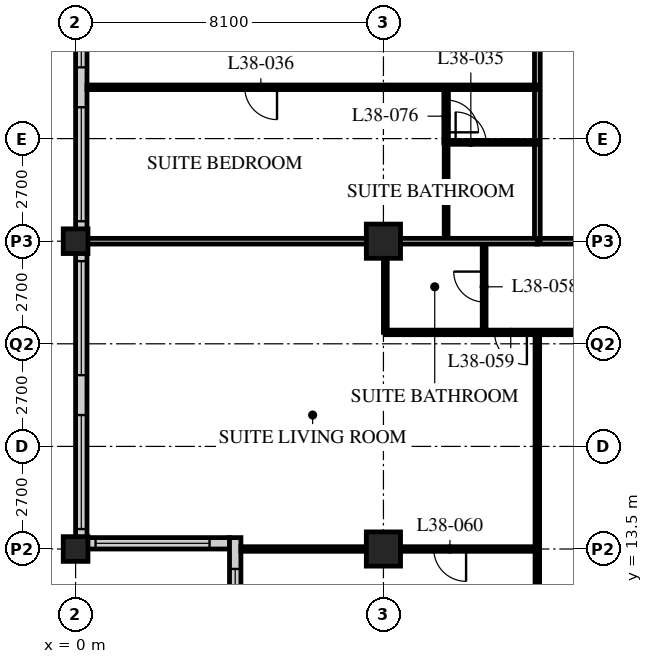
"""IFC4 building model, lengths in metres.
Left out: names, types, materials, properties, quantities, classifications, styles, units other than length and angle.
Written with IfcOpenShell. Run it as: python <this file> out.ifc"""

import sys

from ifc_helpers import new_model, si_unit, direction, frame, frame_2d, origin, origin_2d, place, context, subcontext, project, spatial, rectangle, hollow_rectangle, extrude, element, fill, save


model = new_model("IFC4")
c1 = context("Model", 3, precision=1e-05, world=origin(), true_north=direction((0.0, 1.0)))
c2 = subcontext(c1, "Body", "Model", "MODEL_VIEW")
j1 = project(units=[si_unit("LENGTHUNIT", "METRE"), si_unit("PLANEANGLEUNIT", "RADIAN")], contexts=[c1])
p1 = place(None, origin())
s1 = spatial("IfcSite", under=j1, at=p1, CompositionType="ELEMENT")
p2 = place(p1, origin())
s2 = spatial("IfcBuilding", under=s1, at=p2, CompositionType="ELEMENT")
p3 = place(p2, frame((0.0, 0.0, 147.6)))
s3 = spatial("IfcBuildingStorey", under=s2, at=p3, CompositionType="ELEMENT", Elevation=147.6)
for number, where, z_axis, x_axis in (
    (1, (0.0, 13.5, 0.0), (0.0, 0.0, 1.0), (1.0, 0.0, 0.0)),
    (2, (0.0, 21.6, 0.0), (0.0, 0.0, 1.0), (1.0, 0.0, 0.0)),
):
    element("IfcColumn", number, at=place(p3, frame(where, z_axis=z_axis, x_axis=x_axis)), inside=s3, PredefinedType="COLUMN", context=c2, shape_type="SweptSolid", body=[
        extrude(hollow_rectangle(XDim=0.65, YDim=0.65, WallThickness=0.055, at=origin_2d()), origin(), (0.0, 0.0, 1.0), 3.4),
    ])
for number, where, z_axis, x_axis in (
    (3, (8.1, 13.5, 0.0), (0.0, 0.0, 1.0), (1.0, 0.0, 0.0)),
    (4, (8.1, 21.6, 0.0), (0.0, 0.0, 1.0), (1.0, 0.0, 0.0)),
):
    element("IfcColumn", number, at=place(p3, frame(where, z_axis=z_axis, x_axis=x_axis)), inside=s3, PredefinedType="COLUMN", context=c2, shape_type="SweptSolid", body=[
        extrude(hollow_rectangle(XDim=0.9, YDim=0.9, WallThickness=0.1, at=origin_2d()), origin(), (0.0, 0.0, 1.0), 3.4),
    ])
p4 = place(p3, frame((0.15, 45.6, 0.0), z_axis=(0.0, 0.0, 1.0), x_axis=(0.0, -1.0, 0.0)))
e5 = element("IfcWall", 5, at=p4, inside=s3, PredefinedType="SOLIDWALL", context=c2, shape_type="SweptSolid", body=[
    extrude(rectangle(XDim=32.1, YDim=0.3, at=frame_2d((16.05, 0.0))), origin(), (0.0, 0.0, 1.0), 3.19),
])
p5 = place(p4, frame((0.225, 0.0, 0.9)))
e6 = element("IfcOpeningElement", 6, at=p5, cuts=e5, PredefinedType="OPENING", context=c2, shape_type="SweptSolid", body=[
    extrude(rectangle(XDim=3.0, YDim=1.4, at=frame_2d((1.5, 0.7))), frame((0.0, 0.16, 0.0), z_axis=(0.0, -1.0, 0.0), x_axis=(1.0, 0.0, 0.0)), (0.0, 0.0, 1.0), 0.32),
])
p6 = place(p4, frame((4.275, 0.0, 0.9)))
e7 = element("IfcOpeningElement", 7, at=p6, cuts=e5, PredefinedType="OPENING", context=c2, shape_type="SweptSolid", body=[
    extrude(rectangle(XDim=3.0, YDim=1.4, at=frame_2d((1.5, 0.7))), frame((0.0, 0.16, 0.0), z_axis=(0.0, -1.0, 0.0), x_axis=(1.0, 0.0, 0.0)), (0.0, 0.0, 1.0), 0.32),
])
p7 = place(p4, frame((8.325, 0.0, 0.9)))
e8 = element("IfcOpeningElement", 8, at=p7, cuts=e5, PredefinedType="OPENING", context=c2, shape_type="SweptSolid", body=[
    extrude(rectangle(XDim=3.0, YDim=1.4, at=frame_2d((1.5, 0.7))), frame((0.0, 0.16, 0.0), z_axis=(0.0, -1.0, 0.0), x_axis=(1.0, 0.0, 0.0)), (0.0, 0.0, 1.0), 0.32),
])
p8 = place(p4, frame((12.375, 0.0, 0.9)))
e9 = element("IfcOpeningElement", 9, at=p8, cuts=e5, PredefinedType="OPENING", context=c2, shape_type="SweptSolid", body=[
    extrude(rectangle(XDim=3.0, YDim=1.4, at=frame_2d((1.5, 0.7))), frame((0.0, 0.16, 0.0), z_axis=(0.0, -1.0, 0.0), x_axis=(1.0, 0.0, 0.0)), (0.0, 0.0, 1.0), 0.32),
])
p9 = place(p4, frame((16.425, 0.0, 0.9)))
e10 = element("IfcOpeningElement", 10, at=p9, cuts=e5, PredefinedType="OPENING", context=c2, shape_type="SweptSolid", body=[
    extrude(rectangle(XDim=3.0, YDim=1.4, at=frame_2d((1.5, 0.7))), frame((0.0, 0.16, 0.0), z_axis=(0.0, -1.0, 0.0), x_axis=(1.0, 0.0, 0.0)), (0.0, 0.0, 1.0), 0.32),
])
p10 = place(p4, frame((20.475, 0.0, 0.9)))
e11 = element("IfcOpeningElement", 11, at=p10, cuts=e5, PredefinedType="OPENING", context=c2, shape_type="SweptSolid", body=[
    extrude(rectangle(XDim=3.0, YDim=1.4, at=frame_2d((1.5, 0.7))), frame((0.0, 0.16, 0.0), z_axis=(0.0, -1.0, 0.0), x_axis=(1.0, 0.0, 0.0)), (0.0, 0.0, 1.0), 0.32),
])
p11 = place(p4, frame((24.525, 0.0, 0.9)))
e12 = element("IfcOpeningElement", 12, at=p11, cuts=e5, PredefinedType="OPENING", context=c2, shape_type="SweptSolid", body=[
    extrude(rectangle(XDim=3.0, YDim=1.4, at=frame_2d((1.5, 0.7))), frame((0.0, 0.16, 0.0), z_axis=(0.0, -1.0, 0.0), x_axis=(1.0, 0.0, 0.0)), (0.0, 0.0, 1.0), 0.32),
])
p12 = place(p4, frame((28.575, 0.0, 0.9)))
e13 = element("IfcOpeningElement", 13, at=p12, cuts=e5, PredefinedType="OPENING", context=c2, shape_type="SweptSolid", body=[
    extrude(rectangle(XDim=3.0, YDim=1.4, at=frame_2d((1.5, 0.7))), frame((0.0, 0.16, 0.0), z_axis=(0.0, -1.0, 0.0), x_axis=(1.0, 0.0, 0.0)), (0.0, 0.0, 1.0), 0.32),
])
p13 = place(p3, frame((0.3, 13.65, 0.0), z_axis=(0.0, 0.0, 1.0), x_axis=(1.0, 0.0, 0.0)))
e14 = element("IfcWall", 14, at=p13, inside=s3, PredefinedType="SOLIDWALL", context=c2, shape_type="SweptSolid", body=[
    extrude(rectangle(XDim=3.75, YDim=0.3, at=frame_2d((1.875, 0.0))), origin(), (0.0, 0.0, 1.0), 3.19),
])
p14 = place(p13, frame((0.225, 0.0, 0.9)))
e15 = element("IfcOpeningElement", 15, at=p14, cuts=e14, PredefinedType="OPENING", context=c2, shape_type="SweptSolid", body=[
    extrude(rectangle(XDim=3.0, YDim=1.4, at=frame_2d((1.5, 0.7))), frame((0.0, 0.16, 0.0), z_axis=(0.0, -1.0, 0.0), x_axis=(1.0, 0.0, 0.0)), (0.0, 0.0, 1.0), 0.32),
])
p15 = place(p3, frame((4.2, 13.8, 0.0), z_axis=(0.0, 0.0, 1.0), x_axis=(0.0, -1.0, 0.0)))
e16 = element("IfcWall", 16, at=p15, inside=s3, PredefinedType="SOLIDWALL", context=c2, shape_type="SweptSolid", body=[
    extrude(rectangle(XDim=4.35, YDim=0.3, at=frame_2d((2.175, 0.0))), origin(), (0.0, 0.0, 1.0), 3.19),
])
p16 = place(p15, frame((0.825, 0.0, 0.9)))
e17 = element("IfcOpeningElement", 17, at=p16, cuts=e16, PredefinedType="OPENING", context=c2, shape_type="SweptSolid", body=[
    extrude(rectangle(XDim=3.0, YDim=1.4, at=frame_2d((1.5, 0.7))), frame((0.0, 0.16, 0.0), z_axis=(0.0, -1.0, 0.0), x_axis=(1.0, 0.0, 0.0)), (0.0, 0.0, 1.0), 0.32),
])
p17 = place(p3, frame((12.15, 21.6, 0.0), z_axis=(0.0, 0.0, 1.0), x_axis=(1.0, 0.0, 0.0)))
e18 = element("IfcWall", 18, at=p17, inside=s3, PredefinedType="PARTITIONING", context=c2, shape_type="SweptSolid", body=[
    extrude(rectangle(XDim=36.45, YDim=0.15, at=frame_2d((18.225, 0.0))), origin(), (0.0, 0.0, 1.0), 2.42),
])
p18 = place(p17, frame((5.95, 0.0, 0.0)))
e19 = element("IfcOpeningElement", 19, at=p18, cuts=e18, PredefinedType="OPENING", context=c2, shape_type="SweptSolid", body=[
    extrude(rectangle(XDim=1.0, YDim=2.1, at=frame_2d((0.5, 1.05))), frame((0.0, 0.085, 0.0), z_axis=(0.0, -1.0, 0.0), x_axis=(1.0, 0.0, 0.0)), (0.0, 0.0, 1.0), 0.17),
])
p19 = place(p17, frame((14.05, 0.0, 0.0)))
e20 = element("IfcOpeningElement", 20, at=p19, cuts=e18, PredefinedType="OPENING", context=c2, shape_type="SweptSolid", body=[
    extrude(rectangle(XDim=1.0, YDim=2.1, at=frame_2d((0.5, 1.05))), frame((0.0, 0.085, 0.0), z_axis=(0.0, -1.0, 0.0), x_axis=(1.0, 0.0, 0.0)), (0.0, 0.0, 1.0), 0.17),
])
p20 = place(p17, frame((22.15, 0.0, 0.0)))
e21 = element("IfcOpeningElement", 21, at=p20, cuts=e18, PredefinedType="OPENING", context=c2, shape_type="SweptSolid", body=[
    extrude(rectangle(XDim=1.0, YDim=2.1, at=frame_2d((0.5, 1.05))), frame((0.0, 0.085, 0.0), z_axis=(0.0, -1.0, 0.0), x_axis=(1.0, 0.0, 0.0)), (0.0, 0.0, 1.0), 0.17),
])
p21 = place(p17, frame((30.8, 0.0, 0.0)))
e22 = element("IfcOpeningElement", 22, at=p21, cuts=e18, PredefinedType="OPENING", context=c2, shape_type="SweptSolid", body=[
    extrude(rectangle(XDim=1.0, YDim=2.1, at=frame_2d((0.5, 1.05))), frame((0.0, 0.085, 0.0), z_axis=(0.0, -1.0, 0.0), x_axis=(1.0, 0.0, 0.0)), (0.0, 0.0, 1.0), 0.17),
])
p22 = place(p17, frame((1.525, 0.0, 0.0)))
e23 = element("IfcOpeningElement", 23, at=p22, cuts=e18, PredefinedType="OPENING", context=c2, shape_type="SweptSolid", body=[
    extrude(rectangle(XDim=1.0, YDim=2.1, at=frame_2d((0.5, 1.05))), frame((0.0, 0.085, 0.0), z_axis=(0.0, -1.0, 0.0), x_axis=(1.0, 0.0, 0.0)), (0.0, 0.0, 1.0), 0.17),
])
p23 = place(p17, frame((33.925, 0.0, 0.0)))
e24 = element("IfcOpeningElement", 24, at=p23, cuts=e18, PredefinedType="OPENING", context=c2, shape_type="SweptSolid", body=[
    extrude(rectangle(XDim=1.0, YDim=2.1, at=frame_2d((0.5, 1.05))), frame((0.0, 0.085, 0.0), z_axis=(0.0, -1.0, 0.0), x_axis=(1.0, 0.0, 0.0)), (0.0, 0.0, 1.0), 0.17),
])
p24 = place(p3, frame((12.15, 21.6, 0.0), z_axis=(0.0, 0.0, 1.0), x_axis=(0.0, 1.0, 0.0)))
e25 = element("IfcWall", 25, at=p24, inside=s3, PredefinedType="PARTITIONING", context=c2, shape_type="SweptSolid", body=[
    extrude(rectangle(XDim=24.3, YDim=0.15, at=frame_2d((12.15, 0.0))), origin(), (0.0, 0.0, 1.0), 3.19),
])
p25 = place(p24, frame((5.575, 0.0, 0.0)))
e26 = element("IfcOpeningElement", 26, at=p25, cuts=e25, PredefinedType="OPENING", context=c2, shape_type="SweptSolid", body=[
    extrude(rectangle(XDim=1.0, YDim=2.1, at=frame_2d((0.5, 1.05))), frame((0.0, 0.085, 0.0), z_axis=(0.0, -1.0, 0.0), x_axis=(1.0, 0.0, 0.0)), (0.0, 0.0, 1.0), 0.17),
])
p26 = place(p24, frame((14.05, 0.0, 0.0)))
e27 = element("IfcOpeningElement", 27, at=p26, cuts=e25, PredefinedType="OPENING", context=c2, shape_type="SweptSolid", body=[
    extrude(rectangle(XDim=1.0, YDim=2.1, at=frame_2d((0.5, 1.05))), frame((0.0, 0.085, 0.0), z_axis=(0.0, -1.0, 0.0), x_axis=(1.0, 0.0, 0.0)), (0.0, 0.0, 1.0), 0.17),
])
p27 = place(p24, frame((22.7, 0.0, 0.0)))
e28 = element("IfcOpeningElement", 28, at=p27, cuts=e25, PredefinedType="OPENING", context=c2, shape_type="SweptSolid", body=[
    extrude(rectangle(XDim=1.0, YDim=2.1, at=frame_2d((0.5, 1.05))), frame((0.0, 0.085, 0.0), z_axis=(0.0, -1.0, 0.0), x_axis=(1.0, 0.0, 0.0)), (0.0, 0.0, 1.0), 0.17),
])
p28 = place(p3, frame((9.75, 21.6, 0.0), z_axis=(0.0, 0.0, 1.0), x_axis=(0.0, 1.0, 0.0)))
e29 = element("IfcWall", 29, at=p28, inside=s3, PredefinedType="PARTITIONING", context=c2, shape_type="SweptSolid", body=[
    extrude(rectangle(XDim=2.6, YDim=0.1, at=frame_2d((1.3, 0.0))), origin(), (0.0, 0.0, 1.0), 3.19),
])
p29 = place(p3, frame((12.15, 24.2, 0.0), z_axis=(0.0, 0.0, 1.0), x_axis=(-1.0, 0.0, 0.0)))
e30 = element("IfcWall", 30, at=p29, inside=s3, PredefinedType="PARTITIONING", context=c2, shape_type="SweptSolid", body=[
    extrude(rectangle(XDim=2.4, YDim=0.1, at=frame_2d((1.2, 0.0))), origin(), (0.0, 0.0, 1.0), 3.19),
])
p30 = place(p29, frame((1.35, 0.0, 0.0)))
e31 = element("IfcOpeningElement", 31, at=p30, cuts=e30, PredefinedType="OPENING", context=c2, shape_type="SweptSolid", body=[
    extrude(rectangle(XDim=0.8, YDim=2.1, at=frame_2d((0.4, 1.05))), frame((0.0, 0.06, 0.0), z_axis=(0.0, -1.0, 0.0), x_axis=(1.0, 0.0, 0.0)), (0.0, 0.0, 1.0), 0.12),
])
p31 = place(p3, frame((12.15, 25.65, 0.0), z_axis=(0.0, 0.0, 1.0), x_axis=(-1.0, 0.0, 0.0)))
e32 = element("IfcWall", 32, at=p31, inside=s3, PredefinedType="PARTITIONING", context=c2, shape_type="SweptSolid", body=[
    extrude(rectangle(XDim=11.85, YDim=0.12, at=frame_2d((5.925, 0.0))), origin(), (0.0, 0.0, 1.0), 3.19),
])
p32 = place(p31, frame((6.85, 0.0, 0.0)))
e33 = element("IfcOpeningElement", 33, at=p32, cuts=e32, PredefinedType="OPENING", context=c2, shape_type="SweptSolid", body=[
    extrude(rectangle(XDim=0.85, YDim=2.1, at=frame_2d((0.425, 1.05))), frame((0.0, 0.07, 0.0), z_axis=(0.0, -1.0, 0.0), x_axis=(1.0, 0.0, 0.0)), (0.0, 0.0, 1.0), 0.14),
])
p33 = place(p3, frame((10.75, 21.6, 0.0), z_axis=(0.0, 0.0, 1.0), x_axis=(0.0, -1.0, 0.0)))
e34 = element("IfcWall", 34, at=p33, inside=s3, PredefinedType="PARTITIONING", context=c2, shape_type="SweptSolid", body=[
    extrude(rectangle(XDim=2.4, YDim=0.1, at=frame_2d((1.2, 0.0))), origin(), (0.0, 0.0, 1.0), 3.19),
])
p34 = place(p33, frame((0.8, 0.0, 0.0)))
e35 = element("IfcOpeningElement", 35, at=p34, cuts=e34, PredefinedType="OPENING", context=c2, shape_type="SweptSolid", body=[
    extrude(rectangle(XDim=0.8, YDim=2.1, at=frame_2d((0.4, 1.05))), frame((0.0, 0.06, 0.0), z_axis=(0.0, -1.0, 0.0), x_axis=(1.0, 0.0, 0.0)), (0.0, 0.0, 1.0), 0.12),
])
p35 = place(p3, frame((8.15, 21.6, 0.0), z_axis=(0.0, 0.0, 1.0), x_axis=(0.0, -1.0, 0.0)))
e36 = element("IfcWall", 36, at=p35, inside=s3, PredefinedType="PARTITIONING", context=c2, shape_type="SweptSolid", body=[
    extrude(rectangle(XDim=2.4, YDim=0.1, at=frame_2d((1.2, 0.0))), origin(), (0.0, 0.0, 1.0), 2.42),
])
p36 = place(p3, frame((8.15, 19.2, 0.0), z_axis=(0.0, 0.0, 1.0), x_axis=(1.0, 0.0, 0.0)))
e37 = element("IfcWall", 37, at=p36, inside=s3, PredefinedType="PARTITIONING", context=c2, shape_type="SweptSolid", body=[
    extrude(rectangle(XDim=8.05, YDim=0.12, at=frame_2d((4.025, 0.0))), origin(), (0.0, 0.0, 1.0), 3.19),
])
p37 = place(p36, frame((6.725, 0.0, 0.0)))
e38 = element("IfcOpeningElement", 38, at=p37, cuts=e37, PredefinedType="OPENING", context=c2, shape_type="SweptSolid", body=[
    extrude(rectangle(XDim=0.85, YDim=2.1, at=frame_2d((0.425, 1.05))), frame((0.0, 0.07, 0.0), z_axis=(0.0, -1.0, 0.0), x_axis=(1.0, 0.0, 0.0)), (0.0, 0.0, 1.0), 0.14),
])
p38 = place(p36, frame((2.875, 0.0, 0.0)))
e39 = element("IfcOpeningElement", 39, at=p38, cuts=e37, PredefinedType="OPENING", context=c2, shape_type="SweptSolid", body=[
    extrude(rectangle(XDim=0.85, YDim=2.1, at=frame_2d((0.425, 1.05))), frame((0.0, 0.07, 0.0), z_axis=(0.0, -1.0, 0.0), x_axis=(1.0, 0.0, 0.0)), (0.0, 0.0, 1.0), 0.14),
])
p39 = place(p3, frame((12.15, 19.2, 0.0), z_axis=(0.0, 0.0, 1.0), x_axis=(0.0, -1.0, 0.0)))
e40 = element("IfcWall", 40, at=p39, inside=s3, PredefinedType="PARTITIONING", context=c2, shape_type="SweptSolid", body=[
    extrude(rectangle(XDim=13.5, YDim=0.12, at=frame_2d((6.75, 0.0))), origin(), (0.0, 0.0, 1.0), 3.19),
])
p40 = place(p3, frame((12.15, 13.5, 0.0), z_axis=(0.0, 0.0, 1.0), x_axis=(-1.0, 0.0, 0.0)))
e41 = element("IfcWall", 41, at=p40, inside=s3, PredefinedType="PARTITIONING", context=c2, shape_type="SweptSolid", body=[
    extrude(rectangle(XDim=7.8, YDim=0.12, at=frame_2d((3.9, 0.0))), origin(), (0.0, 0.0, 1.0), 2.42),
])
p41 = place(p40, frame((1.875, 0.0, 0.0)))
e42 = element("IfcOpeningElement", 42, at=p41, cuts=e41, PredefinedType="OPENING", context=c2, shape_type="SweptSolid", body=[
    extrude(rectangle(XDim=0.85, YDim=2.1, at=frame_2d((0.425, 1.05))), frame((0.0, 0.07, 0.0), z_axis=(0.0, -1.0, 0.0), x_axis=(1.0, 0.0, 0.0)), (0.0, 0.0, 1.0), 0.14),
])
p42 = place(p3, frame((0.3, 21.6, 0.0), z_axis=(0.0, 0.0, 1.0), x_axis=(1.0, 0.0, 0.0)))
e43 = element("IfcWall", 43, at=p42, inside=s3, PredefinedType="PARTITIONING", context=c2, shape_type="SweptSolid", body=[
    extrude(rectangle(XDim=11.85, YDim=0.15, at=frame_2d((5.925, 0.0))), origin(), (0.0, 0.0, 1.0), 2.42),
])
p43 = place(p3, frame((9.75, 24.19, 0.0), z_axis=(0.0, 0.0, 1.0), x_axis=(0.0, 1.0, 0.0)))
e44 = element("IfcWall", 44, at=p43, inside=s3, PredefinedType="PARTITIONING", context=c2, shape_type="SweptSolid", body=[
    extrude(rectangle(XDim=1.46, YDim=0.12, at=frame_2d((0.73, 0.0))), origin(), (0.0, 0.0, 1.0), 3.19),
])
p44 = place(p43, frame((0.275, 0.0, 0.0)))
e45 = element("IfcOpeningElement", 45, at=p44, cuts=e44, PredefinedType="OPENING", context=c2, shape_type="SweptSolid", body=[
    extrude(rectangle(XDim=0.85, YDim=2.1, at=frame_2d((0.425, 1.05))), frame((0.0, 0.07, 0.0), z_axis=(0.0, -1.0, 0.0), x_axis=(1.0, 0.0, 0.0)), (0.0, 0.0, 1.0), 0.14),
])
p45 = place(p9, origin())
e46 = element("IfcWindow", 46, at=p45, inside=s3, PartitioningType="SINGLE_PANEL", PredefinedType="WINDOW", context=c2, shape_type="SweptSolid", body=[
    extrude(rectangle(XDim=3.0, YDim=1.4, at=frame_2d((1.5, 0.7))), frame((0.0, 0.03, 0.0), z_axis=(0.0, -1.0, 0.0), x_axis=(1.0, 0.0, 0.0)), (0.0, 0.0, 1.0), 0.06),
])
fill(e10, e46)
p46 = place(p10, origin())
e47 = element("IfcWindow", 47, at=p46, inside=s3, PartitioningType="SINGLE_PANEL", PredefinedType="WINDOW", context=c2, shape_type="SweptSolid", body=[
    extrude(rectangle(XDim=3.0, YDim=1.4, at=frame_2d((1.5, 0.7))), frame((0.0, 0.03, 0.0), z_axis=(0.0, -1.0, 0.0), x_axis=(1.0, 0.0, 0.0)), (0.0, 0.0, 1.0), 0.06),
])
fill(e11, e47)
p47 = place(p11, origin())
e48 = element("IfcWindow", 48, at=p47, inside=s3, PartitioningType="SINGLE_PANEL", PredefinedType="WINDOW", context=c2, shape_type="SweptSolid", body=[
    extrude(rectangle(XDim=3.0, YDim=1.4, at=frame_2d((1.5, 0.7))), frame((0.0, 0.03, 0.0), z_axis=(0.0, -1.0, 0.0), x_axis=(1.0, 0.0, 0.0)), (0.0, 0.0, 1.0), 0.06),
])
fill(e12, e48)
p48 = place(p12, origin())
e49 = element("IfcWindow", 49, at=p48, inside=s3, PartitioningType="SINGLE_PANEL", PredefinedType="WINDOW", context=c2, shape_type="SweptSolid", body=[
    extrude(rectangle(XDim=3.0, YDim=1.4, at=frame_2d((1.5, 0.7))), frame((0.0, 0.03, 0.0), z_axis=(0.0, -1.0, 0.0), x_axis=(1.0, 0.0, 0.0)), (0.0, 0.0, 1.0), 0.06),
])
fill(e13, e49)
p49 = place(p14, origin())
e50 = element("IfcWindow", 50, at=p49, inside=s3, PartitioningType="SINGLE_PANEL", PredefinedType="WINDOW", context=c2, shape_type="SweptSolid", body=[
    extrude(rectangle(XDim=3.0, YDim=1.4, at=frame_2d((1.5, 0.7))), frame((0.0, 0.03, 0.0), z_axis=(0.0, -1.0, 0.0), x_axis=(1.0, 0.0, 0.0)), (0.0, 0.0, 1.0), 0.06),
])
fill(e15, e50)
p50 = place(p16, origin())
e51 = element("IfcWindow", 51, at=p50, inside=s3, PartitioningType="SINGLE_PANEL", PredefinedType="WINDOW", context=c2, shape_type="SweptSolid", body=[
    extrude(rectangle(XDim=3.0, YDim=1.4, at=frame_2d((1.5, 0.7))), frame((0.0, 0.03, 0.0), z_axis=(0.0, -1.0, 0.0), x_axis=(1.0, 0.0, 0.0)), (0.0, 0.0, 1.0), 0.06),
])
fill(e17, e51)
p51 = place(p30, origin())
e52 = element("IfcDoor", 52, at=p51, inside=s3, OperationType="SINGLE_SWING_LEFT", PredefinedType="DOOR", context=c2, shape_type="SweptSolid", body=[
    extrude(rectangle(XDim=0.8, YDim=2.1, at=frame_2d((0.4, 1.05))), frame((0.0, 0.025, 0.0), z_axis=(0.0, -1.0, 0.0), x_axis=(1.0, 0.0, 0.0)), (0.0, 0.0, 1.0), 0.05),
])
fill(e31, e52)
p52 = place(p32, origin())
e53 = element("IfcDoor", 53, at=p52, inside=s3, OperationType="SINGLE_SWING_LEFT", PredefinedType="DOOR", context=c2, shape_type="SweptSolid", body=[
    extrude(rectangle(XDim=0.85, YDim=2.1, at=frame_2d((0.425, 1.05))), frame((0.0, 0.025, 0.0), z_axis=(0.0, -1.0, 0.0), x_axis=(1.0, 0.0, 0.0)), (0.0, 0.0, 1.0), 0.05),
])
fill(e33, e53)
p53 = place(p34, origin())
e54 = element("IfcDoor", 54, at=p53, inside=s3, OperationType="SINGLE_SWING_RIGHT", PredefinedType="DOOR", context=c2, shape_type="SweptSolid", body=[
    extrude(rectangle(XDim=0.8, YDim=2.1, at=frame_2d((0.4, 1.05))), frame((0.0, 0.025, 0.0), z_axis=(0.0, -1.0, 0.0), x_axis=(1.0, 0.0, 0.0)), (0.0, 0.0, 1.0), 0.05),
])
fill(e35, e54)
p54 = place(p38, origin())
e55 = element("IfcDoor", 55, at=p54, inside=s3, OperationType="SINGLE_SWING_LEFT", PredefinedType="DOOR", context=c2, shape_type="SweptSolid", body=[
    extrude(rectangle(XDim=0.85, YDim=2.1, at=frame_2d((0.425, 1.05))), frame((0.0, 0.025, 0.0), z_axis=(0.0, -1.0, 0.0), x_axis=(1.0, 0.0, 0.0)), (0.0, 0.0, 1.0), 0.05),
])
fill(e39, e55)
p55 = place(p41, origin())
e56 = element("IfcDoor", 56, at=p55, inside=s3, OperationType="SINGLE_SWING_LEFT", PredefinedType="DOOR", context=c2, shape_type="SweptSolid", body=[
    extrude(rectangle(XDim=0.85, YDim=2.1, at=frame_2d((0.425, 1.05))), frame((0.0, 0.025, 0.0), z_axis=(0.0, -1.0, 0.0), x_axis=(1.0, 0.0, 0.0)), (0.0, 0.0, 1.0), 0.05),
])
fill(e42, e56)
p56 = place(p44, origin())
e57 = element("IfcDoor", 57, at=p56, inside=s3, OperationType="SINGLE_SWING_RIGHT", PredefinedType="DOOR", context=c2, shape_type="SweptSolid", body=[
    extrude(rectangle(XDim=0.85, YDim=2.1, at=frame_2d((0.425, 1.05))), frame((0.0, 0.025, 0.0), z_axis=(0.0, -1.0, 0.0), x_axis=(1.0, 0.0, 0.0)), (0.0, 0.0, 1.0), 0.05),
])
fill(e45, e57)
save(model, sys.argv[1])
